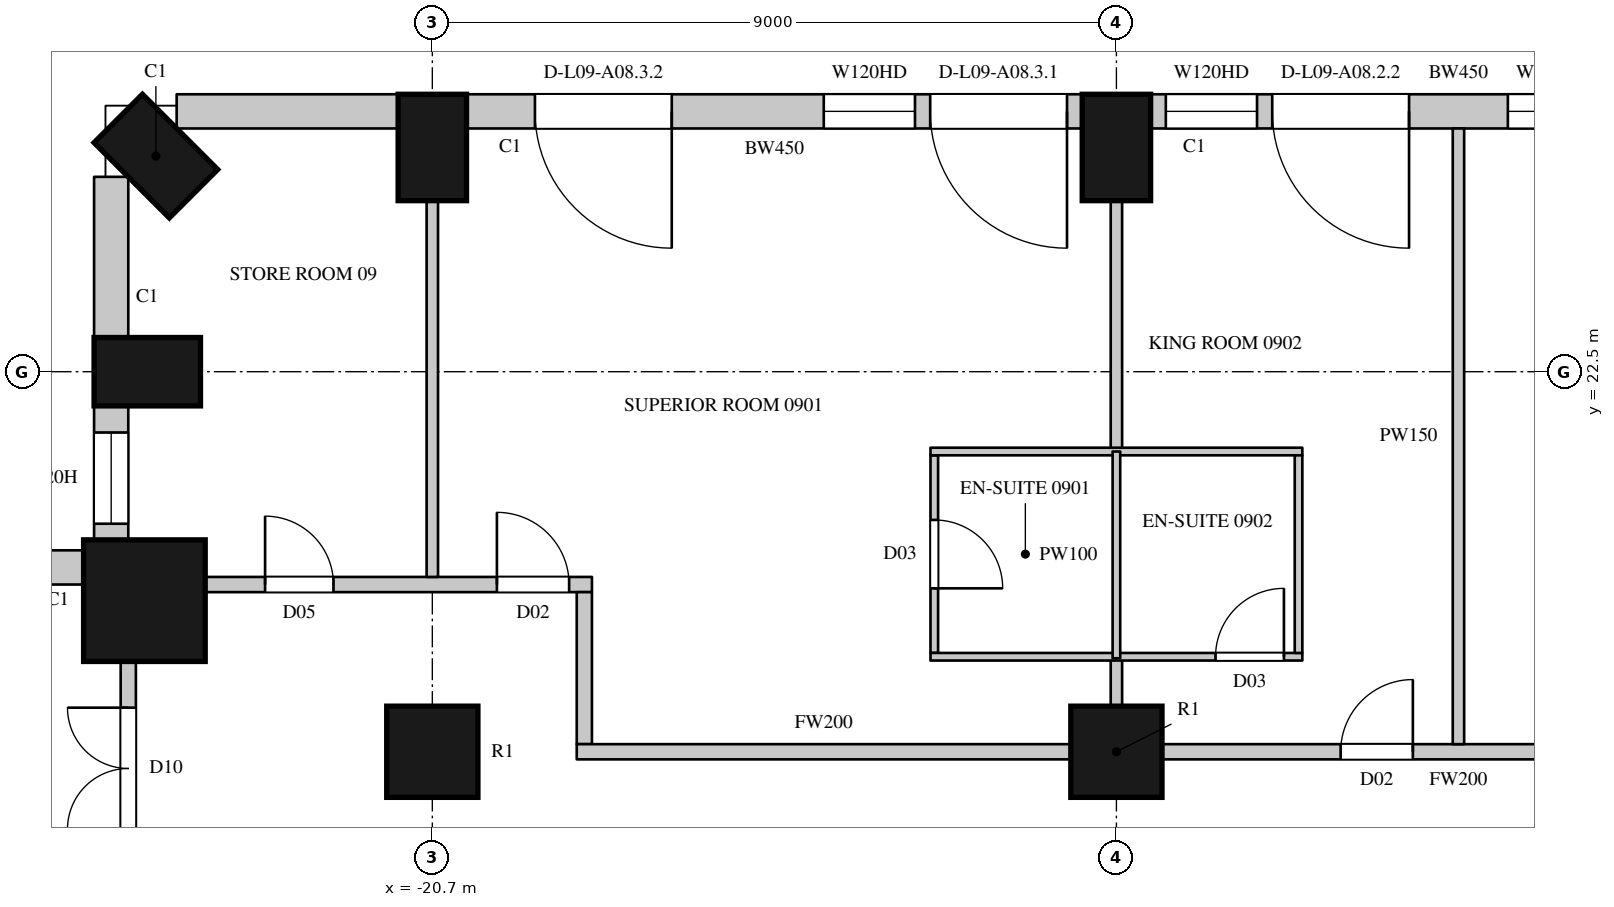
"""IFC4 building model, lengths in metres.
Left out: names, types, materials, properties, quantities, classifications, styles, units other than length and angle.
Written with IfcOpenShell. Run it as: python <this file> out.ifc"""

import sys

from ifc_helpers import new_model, si_unit, direction, frame, frame_2d, origin, origin_2d, place, context, subcontext, project, spatial, rectangle, circle, extrude, element, fill, save


model = new_model("IFC4")
c1 = context("Model", 3, precision=1e-05, world=origin(), true_north=direction((0.0, 1.0)))
c2 = subcontext(c1, "Body", "Model", "MODEL_VIEW")
j1 = project(units=[si_unit("LENGTHUNIT", "METRE"), si_unit("PLANEANGLEUNIT", "RADIAN")], contexts=[c1])
p1 = place(None, origin())
s1 = spatial("IfcSite", under=j1, at=p1, CompositionType="ELEMENT")
p2 = place(p1, origin())
s2 = spatial("IfcBuilding", under=s1, at=p2, CompositionType="ELEMENT")
p3 = place(p2, frame((0.0, 0.0, 62.7)))
s3 = spatial("IfcBuildingStorey", under=s2, at=p3, CompositionType="ELEMENT", Elevation=62.7)
for number, where, z_axis, x_axis in (
    (1, (-11.7, 25.45, 0.0), (0.0, 0.0, 1.0), (-1.0, 0.0, 0.0)),
    (2, (-20.7, 25.45, 0.0), (0.0, 0.0, 1.0), (-1.0, 0.0, 0.0)),
    (3, (-24.337, 25.337, 0.0), (0.0, 0.0, 1.0), (-0.707, -0.707, 0.0)),
    (4, (-24.45, 22.5, 0.0), (0.0, 0.0, 1.0), (0.0, -1.0, 0.0)),
):
    element("IfcColumn", number, at=place(p3, frame(where, z_axis=z_axis, x_axis=x_axis)), inside=s3, PredefinedType="COLUMN", context=c2, shape_type="SweptSolid", body=[
        extrude(rectangle(XDim=0.9, YDim=1.4, at=origin_2d()), origin(), (0.0, 0.0, 1.0), 3.6),
    ])
p4 = place(p3, frame((-24.488, 19.488, 0.0), z_axis=(0.0, 0.0, 1.0), x_axis=(1.0, 0.0, 0.0)))
e5 = element("IfcColumn", 5, at=p4, inside=s3, PredefinedType="COLUMN", context=c2, shape_type="SweptSolid", body=[
    extrude(circle(Radius=0.8, at=origin_2d()), origin(), (0.0, 0.0, 1.0), 3.6),
])
for number, where, z_axis, x_axis in (
    (6, (-20.7, 17.5, 0.0), (0.0, 0.0, 1.0), (1.0, 0.0, 0.0)),
    (7, (-11.7, 17.5, 0.0), (0.0, 0.0, 1.0), (1.0, 0.0, 0.0)),
):
    element("IfcColumn", number, at=place(p3, frame(where, z_axis=z_axis, x_axis=x_axis)), inside=s3, PredefinedType="COLUMN", context=c2, shape_type="SweptSolid", body=[
        extrude(circle(Radius=0.6, at=origin_2d()), origin(), (0.0, 0.0, 1.0), 3.6),
    ])
p5 = place(p3, frame((-3.15, 25.925, 0.0), z_axis=(0.0, 0.0, 1.0), x_axis=(-1.0, 0.0, 0.0)))
e8 = element("IfcWall", 8, at=p5, inside=s3, PredefinedType="SOLIDWALL", context=c2, shape_type="SweptSolid", body=[
    extrude(rectangle(XDim=8.1, YDim=0.45, at=frame_2d((4.05, 0.0))), origin(), (0.0, 0.0, 1.0), 3.3),
])
p6 = place(p5, frame((0.2, 0.0, 0.0)))
e9 = element("IfcOpeningElement", 9, at=p6, cuts=e8, PredefinedType="OPENING", context=c2, shape_type="SweptSolid", body=[
    extrude(rectangle(XDim=1.8, YDim=2.4, at=frame_2d((0.9, 1.2))), frame((0.0, 0.235, 0.0), z_axis=(0.0, -1.0, 0.0), x_axis=(1.0, 0.0, 0.0)), (0.0, 0.0, 1.0), 0.47),
])
p7 = place(p5, frame((2.2, 0.0, 1.05)))
e10 = element("IfcOpeningElement", 10, at=p7, cuts=e8, PredefinedType="OPENING", context=c2, shape_type="SweptSolid", body=[
    extrude(rectangle(XDim=1.2, YDim=2.0, at=frame_2d((0.6, 1.0))), frame((0.0, 0.235, 0.0), z_axis=(0.0, -1.0, 0.0), x_axis=(1.0, 0.0, 0.0)), (0.0, 0.0, 1.0), 0.47),
])
p8 = place(p5, frame((4.7, 0.0, 0.0)))
e11 = element("IfcOpeningElement", 11, at=p8, cuts=e8, PredefinedType="OPENING", context=c2, shape_type="SweptSolid", body=[
    extrude(rectangle(XDim=1.8, YDim=2.4, at=frame_2d((0.9, 1.2))), frame((0.0, 0.235, 0.0), z_axis=(0.0, -1.0, 0.0), x_axis=(1.0, 0.0, 0.0)), (0.0, 0.0, 1.0), 0.47),
])
p9 = place(p5, frame((6.7, 0.0, 1.05)))
e12 = element("IfcOpeningElement", 12, at=p9, cuts=e8, PredefinedType="OPENING", context=c2, shape_type="SweptSolid", body=[
    extrude(rectangle(XDim=1.2, YDim=2.0, at=frame_2d((0.6, 1.0))), frame((0.0, 0.235, 0.0), z_axis=(0.0, -1.0, 0.0), x_axis=(1.0, 0.0, 0.0)), (0.0, 0.0, 1.0), 0.47),
])
p10 = place(p3, frame((-12.15, 25.925, 0.0), z_axis=(0.0, 0.0, 1.0), x_axis=(-1.0, 0.0, 0.0)))
e13 = element("IfcWall", 13, at=p10, inside=s3, PredefinedType="SOLIDWALL", context=c2, shape_type="SweptSolid", body=[
    extrude(rectangle(XDim=8.1, YDim=0.45, at=frame_2d((4.05, 0.0))), origin(), (0.0, 0.0, 1.0), 3.3),
])
p11 = place(p10, frame((0.2, 0.0, 0.0)))
e14 = element("IfcOpeningElement", 14, at=p11, cuts=e13, PredefinedType="OPENING", context=c2, shape_type="SweptSolid", body=[
    extrude(rectangle(XDim=1.8, YDim=2.4, at=frame_2d((0.9, 1.2))), frame((0.0, 0.235, 0.0), z_axis=(0.0, -1.0, 0.0), x_axis=(1.0, 0.0, 0.0)), (0.0, 0.0, 1.0), 0.47),
])
p12 = place(p10, frame((2.2, 0.0, 1.05)))
e15 = element("IfcOpeningElement", 15, at=p12, cuts=e13, PredefinedType="OPENING", context=c2, shape_type="SweptSolid", body=[
    extrude(rectangle(XDim=1.2, YDim=2.0, at=frame_2d((0.6, 1.0))), frame((0.0, 0.235, 0.0), z_axis=(0.0, -1.0, 0.0), x_axis=(1.0, 0.0, 0.0)), (0.0, 0.0, 1.0), 0.47),
])
p13 = place(p10, frame((5.4, 0.0, 0.0)))
e16 = element("IfcOpeningElement", 16, at=p13, cuts=e13, PredefinedType="OPENING", context=c2, shape_type="SweptSolid", body=[
    extrude(rectangle(XDim=1.8, YDim=2.4, at=frame_2d((0.9, 1.2))), frame((0.0, 0.235, 0.0), z_axis=(0.0, -1.0, 0.0), x_axis=(1.0, 0.0, 0.0)), (0.0, 0.0, 1.0), 0.47),
])
p14 = place(p3, frame((-21.15, 25.925, 0.0), z_axis=(0.0, 0.0, 1.0), x_axis=(-1.0, 0.0, 0.0)))
e17 = element("IfcWall", 17, at=p14, inside=s3, PredefinedType="SOLIDWALL", context=c2, shape_type="SweptSolid", body=[
    extrude(rectangle(XDim=2.914, YDim=0.45, at=frame_2d((1.457, 0.0))), origin(), (0.0, 0.0, 1.0), 3.3),
])
p15 = place(p3, frame((-24.925, 25.064, 0.0), z_axis=(0.0, 0.0, 1.0), x_axis=(0.0, -1.0, 0.0)))
e18 = element("IfcWall", 18, at=p15, inside=s3, PredefinedType="SOLIDWALL", context=c2, shape_type="SweptSolid", body=[
    extrude(rectangle(XDim=2.114, YDim=0.45, at=frame_2d((1.057, 0.0))), origin(), (0.0, 0.0, 1.0), 3.3),
])
p16 = place(p3, frame((-24.925, 22.05, 0.0), z_axis=(0.0, 0.0, 1.0), x_axis=(0.0, -1.0, 0.0)))
e19 = element("IfcWall", 19, at=p16, inside=s3, PredefinedType="SOLIDWALL", context=c2, shape_type="SweptSolid", body=[
    extrude(rectangle(XDim=1.792, YDim=0.45, at=frame_2d((0.896, 0.0))), origin(), (0.0, 0.0, 1.0), 3.3),
])
p17 = place(p16, frame((0.35, 0.0, 1.05)))
e20 = element("IfcOpeningElement", 20, at=p17, cuts=e19, PredefinedType="OPENING", context=c2, shape_type="SweptSolid", body=[
    extrude(rectangle(XDim=1.2, YDim=2.0, at=frame_2d((0.6, 1.0))), frame((0.0, 0.235, 0.0), z_axis=(0.0, -1.0, 0.0), x_axis=(1.0, 0.0, 0.0)), (0.0, 0.0, 1.0), 0.47),
])
p18 = place(p3, frame((-25.259, 19.925, 0.0), z_axis=(0.0, 0.0, 1.0), x_axis=(-1.0, 0.0, 0.0)))
e21 = element("IfcWall", 21, at=p18, inside=s3, PredefinedType="SOLIDWALL", context=c2, shape_type="SweptSolid", body=[
    extrude(rectangle(XDim=3.805, YDim=0.45, at=frame_2d((1.903, 0.0))), origin(), (0.0, 0.0, 1.0), 3.3),
])
p19 = place(p18, frame((0.592, 0.0, 1.05)))
e22 = element("IfcOpeningElement", 22, at=p19, cuts=e21, PredefinedType="OPENING", context=c2, shape_type="SweptSolid", body=[
    extrude(rectangle(XDim=2.7, YDim=2.0, at=frame_2d((1.35, 1.0))), frame((0.0, 0.235, 0.0), z_axis=(0.0, -1.0, 0.0), x_axis=(1.0, 0.0, 0.0)), (0.0, 0.0, 1.0), 0.47),
])
p20 = place(p3, frame((-24.7, 16.03, 0.0), z_axis=(0.0, 0.0, 1.0), x_axis=(0.0, 1.0, 0.0)))
e23 = element("IfcWall", 23, at=p20, inside=s3, PredefinedType="PARTITIONING", context=c2, shape_type="SweptSolid", body=[
    extrude(rectangle(XDim=2.67, YDim=0.2, at=frame_2d((1.335, 0.0))), origin(), (0.0, 0.0, 1.0), 3.3),
])
p21 = place(p20, frame((0.45, 0.0, 0.0)))
e24 = element("IfcOpeningElement", 24, at=p21, cuts=e23, PredefinedType="OPENING", context=c2, shape_type="SweptSolid", body=[
    extrude(rectangle(XDim=1.6, YDim=2.4, at=frame_2d((0.8, 1.2))), frame((0.0, 0.11, 0.0), z_axis=(0.0, -1.0, 0.0), x_axis=(1.0, 0.0, 0.0)), (0.0, 0.0, 1.0), 0.22),
])
p22 = place(p3, frame((-23.7, 19.7, 0.0), z_axis=(0.0, 0.0, 1.0), x_axis=(1.0, 0.0, 0.0)))
e25 = element("IfcWall", 25, at=p22, inside=s3, PredefinedType="PARTITIONING", context=c2, shape_type="SweptSolid", body=[
    extrude(rectangle(XDim=5.1, YDim=0.2, at=frame_2d((2.55, 0.0))), origin(), (0.0, 0.0, 1.0), 3.3),
])
p23 = place(p22, frame((0.8, 0.0, 0.0)))
e26 = element("IfcOpeningElement", 26, at=p23, cuts=e25, PredefinedType="OPENING", context=c2, shape_type="SweptSolid", body=[
    extrude(rectangle(XDim=0.9, YDim=2.2, at=frame_2d((0.45, 1.1))), frame((0.0, 0.11, 0.0), z_axis=(0.0, -1.0, 0.0), x_axis=(1.0, 0.0, 0.0)), (0.0, 0.0, 1.0), 0.22),
])
p24 = place(p22, frame((3.85, 0.0, 0.0)))
e27 = element("IfcOpeningElement", 27, at=p24, cuts=e25, PredefinedType="OPENING", context=c2, shape_type="SweptSolid", body=[
    extrude(rectangle(XDim=0.95, YDim=2.2, at=frame_2d((0.475, 1.1))), frame((0.0, 0.11, 0.0), z_axis=(0.0, -1.0, 0.0), x_axis=(1.0, 0.0, 0.0)), (0.0, 0.0, 1.0), 0.22),
])
p25 = place(p3, frame((-18.7, 17.6, 0.0), z_axis=(0.0, 0.0, 1.0), x_axis=(0.0, 1.0, 0.0)))
e28 = element("IfcWall", 28, at=p25, inside=s3, PredefinedType="PARTITIONING", context=c2, shape_type="SweptSolid", body=[
    extrude(rectangle(XDim=2.0, YDim=0.2, at=frame_2d((1.0, 0.0))), origin(), (0.0, 0.0, 1.0), 3.3),
])
p26 = place(p3, frame((-18.8, 17.5, 0.0), z_axis=(0.0, 0.0, 1.0), x_axis=(1.0, 0.0, 0.0)))
e29 = element("IfcWall", 29, at=p26, inside=s3, PredefinedType="PARTITIONING", context=c2, shape_type="SweptSolid", body=[
    extrude(rectangle(XDim=6.5, YDim=0.2, at=frame_2d((3.25, 0.0))), origin(), (0.0, 0.0, 1.0), 2.75),
])
p27 = place(p3, frame((-11.1, 17.5, 0.0), z_axis=(0.0, 0.0, 1.0), x_axis=(1.0, 0.0, 0.0)))
e30 = element("IfcWall", 30, at=p27, inside=s3, PredefinedType="PARTITIONING", context=c2, shape_type="SweptSolid", body=[
    extrude(rectangle(XDim=7.8, YDim=0.2, at=frame_2d((3.9, 0.0))), origin(), (0.0, 0.0, 1.0), 2.75),
])
p28 = place(p27, frame((2.35, 0.0, 0.0)))
e31 = element("IfcOpeningElement", 31, at=p28, cuts=e30, PredefinedType="OPENING", context=c2, shape_type="SweptSolid", body=[
    extrude(rectangle(XDim=0.95, YDim=2.2, at=frame_2d((0.475, 1.1))), frame((0.0, 0.11, 0.0), z_axis=(0.0, -1.0, 0.0), x_axis=(1.0, 0.0, 0.0)), (0.0, 0.0, 1.0), 0.22),
])
p29 = place(p27, frame((5.2, 0.0, 0.0)))
e32 = element("IfcOpeningElement", 32, at=p29, cuts=e30, PredefinedType="OPENING", context=c2, shape_type="SweptSolid", body=[
    extrude(rectangle(XDim=0.95, YDim=2.2, at=frame_2d((0.475, 1.1))), frame((0.0, 0.11, 0.0), z_axis=(0.0, -1.0, 0.0), x_axis=(1.0, 0.0, 0.0)), (0.0, 0.0, 1.0), 0.22),
])
p30 = place(p3, frame((-20.7, 19.8, 0.0), z_axis=(0.0, 0.0, 1.0), x_axis=(0.0, 1.0, 0.0)))
e33 = element("IfcWall", 33, at=p30, inside=s3, PredefinedType="PARTITIONING", context=c2, shape_type="SweptSolid", body=[
    extrude(rectangle(XDim=4.95, YDim=0.15, at=frame_2d((2.475, 0.0))), origin(), (0.0, 0.0, 1.0), 2.75),
])
p31 = place(p3, frame((-11.7, 18.1, 0.0), z_axis=(0.0, 0.0, 1.0), x_axis=(0.0, 1.0, 0.0)))
e34 = element("IfcWall", 34, at=p31, inside=s3, PredefinedType="PARTITIONING", context=c2, shape_type="SweptSolid", body=[
    extrude(rectangle(XDim=0.63, YDim=0.15, at=frame_2d((0.315, 0.0))), origin(), (0.0, 0.0, 1.0), 2.75),
])
p32 = place(p3, frame((-11.7, 21.45, 0.0), z_axis=(0.0, 0.0, 1.0), x_axis=(0.0, 1.0, 0.0)))
e35 = element("IfcWall", 35, at=p32, inside=s3, PredefinedType="PARTITIONING", context=c2, shape_type="SweptSolid", body=[
    extrude(rectangle(XDim=3.3, YDim=0.15, at=frame_2d((1.65, 0.0))), origin(), (0.0, 0.0, 1.0), 2.75),
])
p33 = place(p3, frame((-7.2, 17.6, 0.0), z_axis=(0.0, 0.0, 1.0), x_axis=(0.0, 1.0, 0.0)))
e36 = element("IfcWall", 36, at=p33, inside=s3, PredefinedType="PARTITIONING", context=c2, shape_type="SweptSolid", body=[
    extrude(rectangle(XDim=8.1, YDim=0.15, at=frame_2d((4.05, 0.0))), origin(), (0.0, 0.0, 1.0), 2.65),
])
p34 = place(p3, frame((-14.096, 18.8, 0.0), z_axis=(0.0, 0.0, 1.0), x_axis=(0.0, 1.0, 0.0)))
e37 = element("IfcWall", 37, at=p34, inside=s3, PredefinedType="PARTITIONING", context=c2, shape_type="SweptSolid", body=[
    extrude(rectangle(XDim=2.6, YDim=0.1, at=frame_2d((1.3, 0.0))), origin(), (0.0, 0.0, 1.0), 3.3),
])
p35 = place(p34, frame((0.85, 0.0, 0.0)))
e38 = element("IfcOpeningElement", 38, at=p35, cuts=e37, PredefinedType="OPENING", context=c2, shape_type="SweptSolid", body=[
    extrude(rectangle(XDim=0.9, YDim=2.2, at=frame_2d((0.45, 1.1))), frame((0.0, 0.06, 0.0), z_axis=(0.0, -1.0, 0.0), x_axis=(1.0, 0.0, 0.0)), (0.0, 0.0, 1.0), 0.12),
])
p36 = place(p3, frame((-14.146, 18.75, 0.0), z_axis=(0.0, 0.0, 1.0), x_axis=(1.0, 0.0, 0.0)))
e39 = element("IfcWall", 39, at=p36, inside=s3, PredefinedType="PARTITIONING", context=c2, shape_type="SweptSolid", body=[
    extrude(rectangle(XDim=4.892, YDim=0.1, at=frame_2d((2.446, 0.0))), origin(), (0.0, 0.0, 1.0), 3.3),
])
p37 = place(p36, frame((3.75, 0.0, 0.0)))
e40 = element("IfcOpeningElement", 40, at=p37, cuts=e39, PredefinedType="OPENING", context=c2, shape_type="SweptSolid", body=[
    extrude(rectangle(XDim=0.9, YDim=2.2, at=frame_2d((0.45, 1.1))), frame((0.0, 0.06, 0.0), z_axis=(0.0, -1.0, 0.0), x_axis=(1.0, 0.0, 0.0)), (0.0, 0.0, 1.0), 0.12),
])
p38 = place(p3, frame((-14.146, 21.45, 0.0), z_axis=(0.0, 0.0, 1.0), x_axis=(1.0, 0.0, 0.0)))
e41 = element("IfcWall", 41, at=p38, inside=s3, PredefinedType="PARTITIONING", context=c2, shape_type="SweptSolid", body=[
    extrude(rectangle(XDim=4.892, YDim=0.1, at=frame_2d((2.446, 0.0))), origin(), (0.0, 0.0, 1.0), 3.3),
])
p39 = place(p3, frame((-11.7, 18.73, 0.0), z_axis=(0.0, 0.0, 1.0), x_axis=(0.0, 1.0, 0.0)))
e42 = element("IfcWall", 42, at=p39, inside=s3, PredefinedType="PARTITIONING", context=c2, shape_type="SweptSolid", body=[
    extrude(rectangle(XDim=2.72, YDim=0.1, at=frame_2d((1.36, 0.0))), origin(), (0.0, 0.0, 1.0), 2.75),
])
p40 = place(p3, frame((-9.304, 18.8, 0.0), z_axis=(0.0, 0.0, 1.0), x_axis=(0.0, 1.0, 0.0)))
e43 = element("IfcWall", 43, at=p40, inside=s3, PredefinedType="PARTITIONING", context=c2, shape_type="SweptSolid", body=[
    extrude(rectangle(XDim=2.6, YDim=0.1, at=frame_2d((1.3, 0.0))), origin(), (0.0, 0.0, 1.0), 3.3),
])
p41 = place(p7, origin())
e44 = element("IfcWindow", 44, at=p41, inside=s3, PartitioningType="SINGLE_PANEL", PredefinedType="WINDOW", context=c2, shape_type="SweptSolid", body=[
    extrude(rectangle(XDim=1.2, YDim=2.0, at=frame_2d((0.6, 1.0))), frame((0.0, 0.135, 0.0), z_axis=(0.0, -1.0, 0.0), x_axis=(1.0, 0.0, 0.0)), (0.0, 0.0, 1.0), 0.06),
])
fill(e10, e44)
p42 = place(p8, origin())
e45 = element("IfcDoor", 45, at=p42, inside=s3, OperationType="SLIDING_TO_LEFT", PredefinedType="DOOR", context=c2, shape_type="SweptSolid", body=[
    extrude(rectangle(XDim=1.8, YDim=2.4, at=frame_2d((0.9, 1.2))), frame((0.0, 0.13, 0.0), z_axis=(0.0, -1.0, 0.0), x_axis=(1.0, 0.0, 0.0)), (0.0, 0.0, 1.0), 0.05),
])
fill(e11, e45)
p43 = place(p9, origin())
e46 = element("IfcWindow", 46, at=p43, inside=s3, PartitioningType="SINGLE_PANEL", PredefinedType="WINDOW", context=c2, shape_type="SweptSolid", body=[
    extrude(rectangle(XDim=1.2, YDim=2.0, at=frame_2d((0.6, 1.0))), frame((0.0, 0.135, 0.0), z_axis=(0.0, -1.0, 0.0), x_axis=(1.0, 0.0, 0.0)), (0.0, 0.0, 1.0), 0.06),
])
fill(e12, e46)
p44 = place(p11, origin())
e47 = element("IfcDoor", 47, at=p44, inside=s3, OperationType="SLIDING_TO_LEFT", PredefinedType="DOOR", context=c2, shape_type="SweptSolid", body=[
    extrude(rectangle(XDim=1.8, YDim=2.4, at=frame_2d((0.9, 1.2))), frame((0.0, 0.13, 0.0), z_axis=(0.0, -1.0, 0.0), x_axis=(1.0, 0.0, 0.0)), (0.0, 0.0, 1.0), 0.05),
])
fill(e14, e47)
p45 = place(p12, origin())
e48 = element("IfcWindow", 48, at=p45, inside=s3, PartitioningType="SINGLE_PANEL", PredefinedType="WINDOW", context=c2, shape_type="SweptSolid", body=[
    extrude(rectangle(XDim=1.2, YDim=2.0, at=frame_2d((0.6, 1.0))), frame((0.0, 0.135, 0.0), z_axis=(0.0, -1.0, 0.0), x_axis=(1.0, 0.0, 0.0)), (0.0, 0.0, 1.0), 0.06),
])
fill(e15, e48)
p46 = place(p13, origin())
e49 = element("IfcDoor", 49, at=p46, inside=s3, OperationType="SLIDING_TO_LEFT", PredefinedType="DOOR", context=c2, shape_type="SweptSolid", body=[
    extrude(rectangle(XDim=1.8, YDim=2.4, at=frame_2d((0.9, 1.2))), frame((0.0, 0.13, 0.0), z_axis=(0.0, -1.0, 0.0), x_axis=(1.0, 0.0, 0.0)), (0.0, 0.0, 1.0), 0.05),
])
fill(e16, e49)
p47 = place(p17, origin())
e50 = element("IfcWindow", 50, at=p47, inside=s3, PartitioningType="SINGLE_PANEL", PredefinedType="WINDOW", context=c2, shape_type="SweptSolid", body=[
    extrude(rectangle(XDim=1.2, YDim=2.0, at=frame_2d((0.6, 1.0))), frame((0.0, 0.135, 0.0), z_axis=(0.0, -1.0, 0.0), x_axis=(1.0, 0.0, 0.0)), (0.0, 0.0, 1.0), 0.06),
])
fill(e20, e50)
p48 = place(p23, origin())
e51 = element("IfcDoor", 51, at=p48, inside=s3, OperationType="SINGLE_SWING_LEFT", PredefinedType="DOOR", context=c2, shape_type="SweptSolid", body=[
    extrude(rectangle(XDim=0.9, YDim=2.2, at=frame_2d((0.45, 1.1))), frame((0.0, 0.025, 0.0), z_axis=(0.0, -1.0, 0.0), x_axis=(1.0, 0.0, 0.0)), (0.0, 0.0, 1.0), 0.05),
])
fill(e26, e51)
p49 = place(p21, origin())
e52 = element("IfcDoor", 52, at=p49, inside=s3, OperationType="DOUBLE_DOOR_SINGLE_SWING", PredefinedType="DOOR", context=c2, shape_type="SweptSolid", body=[
    extrude(rectangle(XDim=1.6, YDim=2.4, at=frame_2d((0.8, 1.2))), frame((0.0, 0.025, 0.0), z_axis=(0.0, -1.0, 0.0), x_axis=(1.0, 0.0, 0.0)), (0.0, 0.0, 1.0), 0.05),
])
fill(e24, e52)
p50 = place(p24, origin())
e53 = element("IfcDoor", 53, at=p50, inside=s3, OperationType="SINGLE_SWING_LEFT", PredefinedType="DOOR", context=c2, shape_type="SweptSolid", body=[
    extrude(rectangle(XDim=0.95, YDim=2.2, at=frame_2d((0.475, 1.1))), frame((0.0, 0.025, 0.0), z_axis=(0.0, -1.0, 0.0), x_axis=(1.0, 0.0, 0.0)), (0.0, 0.0, 1.0), 0.05),
])
fill(e27, e53)
p51 = place(p35, origin())
e54 = element("IfcDoor", 54, at=p51, inside=s3, OperationType="SINGLE_SWING_RIGHT", PredefinedType="DOOR", context=c2, shape_type="SweptSolid", body=[
    extrude(rectangle(XDim=0.9, YDim=2.2, at=frame_2d((0.45, 1.1))), frame((0.0, 0.025, 0.0), z_axis=(0.0, -1.0, 0.0), x_axis=(1.0, 0.0, 0.0)), (0.0, 0.0, 1.0), 0.05),
])
fill(e38, e54)
p52 = place(p28, origin())
e55 = element("IfcDoor", 55, at=p52, inside=s3, OperationType="SINGLE_SWING_RIGHT", PredefinedType="DOOR", context=c2, shape_type="SweptSolid", body=[
    extrude(rectangle(XDim=0.95, YDim=2.2, at=frame_2d((0.475, 1.1))), frame((0.0, 0.025, 0.0), z_axis=(0.0, -1.0, 0.0), x_axis=(1.0, 0.0, 0.0)), (0.0, 0.0, 1.0), 0.05),
])
fill(e31, e55)
p53 = place(p37, origin())
e56 = element("IfcDoor", 56, at=p53, inside=s3, OperationType="SINGLE_SWING_RIGHT", PredefinedType="DOOR", context=c2, shape_type="SweptSolid", body=[
    extrude(rectangle(XDim=0.9, YDim=2.2, at=frame_2d((0.45, 1.1))), frame((0.0, 0.025, 0.0), z_axis=(0.0, -1.0, 0.0), x_axis=(1.0, 0.0, 0.0)), (0.0, 0.0, 1.0), 0.05),
])
fill(e40, e56)
save(model, sys.argv[1])
